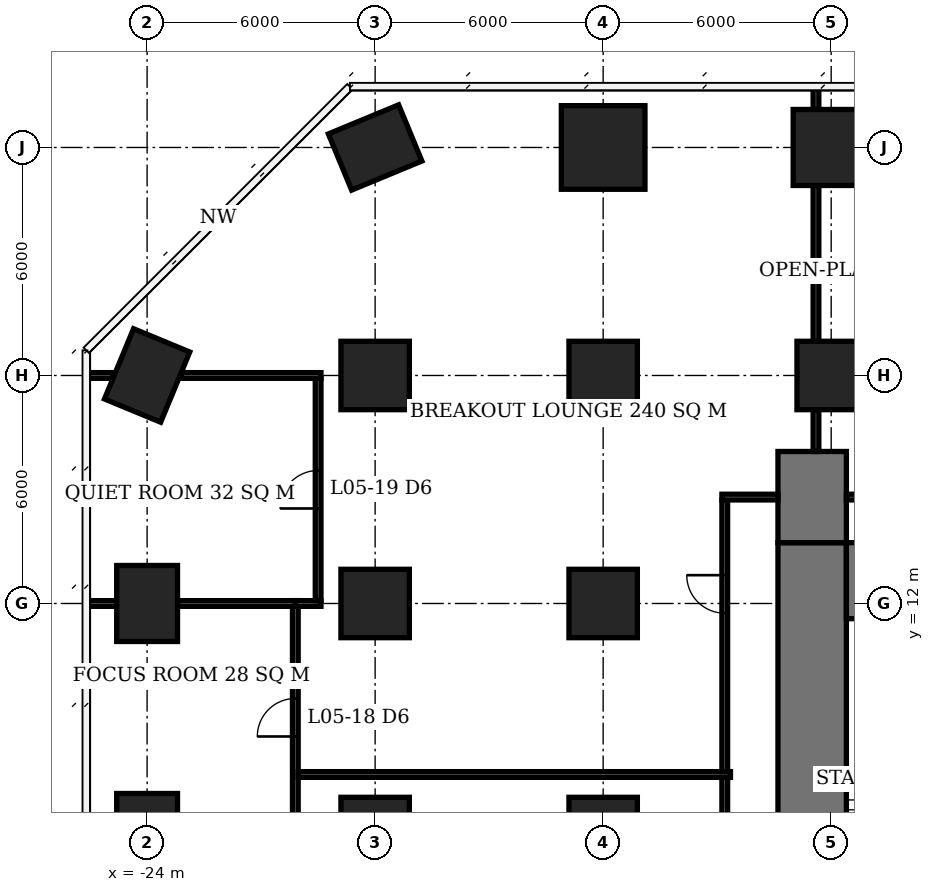
"""IFC4 building model, lengths in metres.
Left out: names, types, materials, properties, quantities, classifications, styles, units other than length and angle.
Written with IfcOpenShell. Run it as: python <this file> out.ifc"""

import sys

from ifc_helpers import new_model, si_unit, direction, frame, frame_2d, origin, origin_2d, place, context, subcontext, project, spatial, rectangle, extrude, element, fill, save


model = new_model("IFC4")
c1 = context("Model", 3, precision=1e-05, world=origin(), true_north=direction((0.0, 1.0)))
c2 = subcontext(c1, "Body", "Model", "MODEL_VIEW")
j1 = project(units=[si_unit("LENGTHUNIT", "METRE"), si_unit("PLANEANGLEUNIT", "RADIAN")], contexts=[c1])
p1 = place(None, origin())
s1 = spatial("IfcSite", under=j1, at=p1, CompositionType="ELEMENT")
p2 = place(p1, origin())
s2 = spatial("IfcBuilding", under=s1, at=p2, CompositionType="ELEMENT")
p3 = place(p2, frame((0.0, 0.0, 26.0)))
s3 = spatial("IfcBuildingStorey", under=s2, at=p3, CompositionType="ELEMENT", Elevation=26.0)
for number, where, z_axis, x_axis in (
    (1, (-24.0, 6.0, 0.0), (0.0, 0.0, 1.0), (0.0, 1.0, 0.0)),
    (2, (-24.0, 12.0, 0.0), (0.0, 0.0, 1.0), (0.0, 1.0, 0.0)),
    (3, (-24.0, 18.0, 0.0), (0.0, 0.0, 1.0), (0.383, 0.924, 0.0)),
):
    element("IfcColumn", number, at=place(p3, frame(where, z_axis=z_axis, x_axis=x_axis)), inside=s3, PredefinedType="COLUMN", context=c2, shape_type="SweptSolid", body=[
        extrude(rectangle(XDim=2.0, YDim=1.6, at=origin_2d()), origin(), (0.0, 0.0, 1.0), 3.9),
    ])
for number, where, z_axis, x_axis in (
    (4, (-18.0, 6.0, 0.0), (0.0, 0.0, 1.0), (1.0, 0.0, 0.0)),
    (5, (-18.0, 12.0, 0.0), (0.0, 0.0, 1.0), (1.0, 0.0, 0.0)),
    (6, (-18.0, 18.0, 0.0), (0.0, 0.0, 1.0), (1.0, 0.0, 0.0)),
):
    element("IfcColumn", number, at=place(p3, frame(where, z_axis=z_axis, x_axis=x_axis)), inside=s3, PredefinedType="COLUMN", context=c2, shape_type="SweptSolid", body=[
        extrude(rectangle(XDim=1.8, YDim=1.8, at=origin_2d()), origin(), (0.0, 0.0, 1.0), 3.9),
    ])
p4 = place(p3, frame((-18.0, 24.0, 0.0), z_axis=(0.0, 0.0, 1.0), x_axis=(0.923879532511, 0.382683432365, 0.0)))
e7 = element("IfcColumn", 7, at=p4, inside=s3, PredefinedType="COLUMN", context=c2, shape_type="SweptSolid", body=[
    extrude(rectangle(XDim=2.0, YDim=1.6, at=origin_2d()), origin(), (0.0, 0.0, 1.0), 3.9),
])
for number, where, z_axis, x_axis in (
    (8, (-12.0, 6.0, 0.0), (0.0, 0.0, 1.0), (1.0, 0.0, 0.0)),
    (9, (-12.0, 12.0, 0.0), (0.0, 0.0, 1.0), (1.0, 0.0, 0.0)),
    (10, (-12.0, 18.0, 0.0), (0.0, 0.0, 1.0), (1.0, 0.0, 0.0)),
):
    element("IfcColumn", number, at=place(p3, frame(where, z_axis=z_axis, x_axis=x_axis)), inside=s3, PredefinedType="COLUMN", context=c2, shape_type="SweptSolid", body=[
        extrude(rectangle(XDim=1.8, YDim=1.8, at=origin_2d()), origin(), (0.0, 0.0, 1.0), 3.9),
    ])
p5 = place(p3, frame((-12.0, 24.0, 0.0), z_axis=(0.0, 0.0, 1.0), x_axis=(1.0, 0.0, 0.0)))
e11 = element("IfcColumn", 11, at=p5, inside=s3, PredefinedType="COLUMN", context=c2, shape_type="SweptSolid", body=[
    extrude(rectangle(XDim=2.2, YDim=2.2, at=origin_2d()), origin(), (0.0, 0.0, 1.0), 3.9),
])
p6 = place(p3, frame((-6.0, 18.0, 0.0), z_axis=(0.0, 0.0, 1.0), x_axis=(1.0, 0.0, 0.0)))
e12 = element("IfcColumn", 12, at=p6, inside=s3, PredefinedType="COLUMN", context=c2, shape_type="SweptSolid", body=[
    extrude(rectangle(XDim=1.8, YDim=1.8, at=origin_2d()), origin(), (0.0, 0.0, 1.0), 3.9),
])
p7 = place(p3, frame((-6.0, 24.0, 0.0), z_axis=(0.0, 0.0, 1.0), x_axis=(1.0, 0.0, 0.0)))
e13 = element("IfcColumn", 13, at=p7, inside=s3, PredefinedType="COLUMN", context=c2, shape_type="SweptSolid", body=[
    extrude(rectangle(XDim=2.0, YDim=2.0, at=origin_2d()), origin(), (0.0, 0.0, 1.0), 3.9),
])
p8 = place(p3, frame((-5.6, 12.6, 0.0), z_axis=(0.0, 0.0, 1.0), x_axis=(1.0, 0.0, 0.0)))
e14 = element("IfcWall", 14, at=p8, inside=s3, PredefinedType="SHEAR", context=c2, shape_type="SweptSolid", body=[
    extrude(rectangle(XDim=23.2, YDim=2.0, at=frame_2d((11.6, 0.0))), origin(), (0.0, 0.0, 1.0), 3.9),
])
p9 = place(p3, frame((-6.5, -7.6, 0.0), z_axis=(0.0, 0.0, 1.0), x_axis=(0.0, 1.0, 0.0)))
e15 = element("IfcWall", 15, at=p9, inside=s3, PredefinedType="SHEAR", context=c2, shape_type="SweptSolid", body=[
    extrude(rectangle(XDim=21.2, YDim=1.8, at=frame_2d((10.6, 0.0))), origin(), (0.0, 0.0, 1.0), 3.9),
])
p10 = place(p9, frame((7.8, 0.0, 0.0)))
e16 = element("IfcOpeningElement", 16, at=p10, cuts=e15, PredefinedType="OPENING", context=c2, shape_type="SweptSolid", body=[
    extrude(rectangle(XDim=1.8, YDim=2.4, at=frame_2d((0.9, 1.2))), frame((0.0, 0.91, 0.0), z_axis=(0.0, -1.0, 0.0), x_axis=(1.0, 0.0, 0.0)), (0.0, 0.0, 1.0), 1.82),
])
p11 = place(p3, frame((-6.5, 13.6, 0.0), z_axis=(0.0, 0.0, 1.0), x_axis=(0.0, 1.0, 0.0)))
e17 = element("IfcWall", 17, at=p11, inside=s3, PredefinedType="SHEAR", context=c2, shape_type="SweptSolid", body=[
    extrude(rectangle(XDim=2.4, YDim=1.8, at=frame_2d((1.2, 0.0))), origin(), (0.0, 0.0, 1.0), 3.9),
])
p12 = place(p3, frame((-25.6, 12.0, 0.0), z_axis=(0.0, 0.0, 1.0), x_axis=(1.0, 0.0, 0.0)))
e18 = element("IfcWall", 18, at=p12, inside=s3, PredefinedType="PARTITIONING", context=c2, shape_type="SweptSolid", body=[
    extrude(rectangle(XDim=0.8, YDim=0.15, at=frame_2d((0.4, 0.0))), origin(), (0.0, 0.0, 1.0), 3.65),
])
p13 = place(p3, frame((-23.2, 12.0, 0.0), z_axis=(0.0, 0.0, 1.0), x_axis=(1.0, 0.0, 0.0)))
e19 = element("IfcWall", 19, at=p13, inside=s3, PredefinedType="PARTITIONING", context=c2, shape_type="SweptSolid", body=[
    extrude(rectangle(XDim=3.175, YDim=0.15, at=frame_2d((1.587, 0.0))), origin(), (0.0, 0.0, 1.0), 3.65),
])
p14 = place(p3, frame((-20.1, 12.0, 0.0), z_axis=(0.0, 0.0, 1.0), x_axis=(1.0, 0.0, 0.0)))
e20 = element("IfcWall", 20, at=p14, inside=s3, PredefinedType="PARTITIONING", context=c2, shape_type="SweptSolid", body=[
    extrude(rectangle(XDim=0.675, YDim=0.15, at=frame_2d((0.337, 0.0))), origin(), (0.0, 0.0, 1.0), 3.65),
])
p15 = place(p3, frame((-25.6, 18.0, 0.0), z_axis=(0.0, 0.0, 1.0), x_axis=(1.0, 0.0, 0.0)))
e21 = element("IfcWall", 21, at=p15, inside=s3, PredefinedType="PARTITIONING", context=c2, shape_type="SweptSolid", body=[
    extrude(rectangle(XDim=0.703, YDim=0.15, at=frame_2d((0.352, 0.0))), origin(), (0.0, 0.0, 1.0), 3.65),
])
p16 = place(p3, frame((-23.103, 18.0, 0.0), z_axis=(0.0, 0.0, 1.0), x_axis=(1.0, 0.0, 0.0)))
e22 = element("IfcWall", 22, at=p16, inside=s3, PredefinedType="PARTITIONING", context=c2, shape_type="SweptSolid", body=[
    extrude(rectangle(XDim=3.678, YDim=0.15, at=frame_2d((1.839, 0.0))), origin(), (0.0, 0.0, 1.0), 3.65),
])
p17 = place(p3, frame((-20.1, 6.075, 0.0), z_axis=(0.0, 0.0, 1.0), x_axis=(0.0, 1.0, 0.0)))
e23 = element("IfcWall", 23, at=p17, inside=s3, PredefinedType="PARTITIONING", context=c2, shape_type="SweptSolid", body=[
    extrude(rectangle(XDim=5.85, YDim=0.15, at=frame_2d((2.925, 0.0))), origin(), (0.0, 0.0, 1.0), 3.65),
])
p18 = place(p17, frame((2.425, 0.0, 0.0)))
e24 = element("IfcOpeningElement", 24, at=p18, cuts=e23, PredefinedType="OPENING", context=c2, shape_type="SweptSolid", body=[
    extrude(rectangle(XDim=1.0, YDim=2.1, at=frame_2d((0.5, 1.05))), frame((0.0, 0.085, 0.0), z_axis=(0.0, -1.0, 0.0), x_axis=(1.0, 0.0, 0.0)), (0.0, 0.0, 1.0), 0.17),
])
p19 = place(p3, frame((-19.5, 12.075, 0.0), z_axis=(0.0, 0.0, 1.0), x_axis=(0.0, 1.0, 0.0)))
e25 = element("IfcWall", 25, at=p19, inside=s3, PredefinedType="PARTITIONING", context=c2, shape_type="SweptSolid", body=[
    extrude(rectangle(XDim=5.85, YDim=0.15, at=frame_2d((2.925, 0.0))), origin(), (0.0, 0.0, 1.0), 3.65),
])
p20 = place(p19, frame((2.425, 0.0, 0.0)))
e26 = element("IfcOpeningElement", 26, at=p20, cuts=e25, PredefinedType="OPENING", context=c2, shape_type="SweptSolid", body=[
    extrude(rectangle(XDim=1.0, YDim=2.1, at=frame_2d((0.5, 1.05))), frame((0.0, 0.085, 0.0), z_axis=(0.0, -1.0, 0.0), x_axis=(1.0, 0.0, 0.0)), (0.0, 0.0, 1.0), 0.17),
])
p21 = place(p3, frame((-20.025, 7.5, 0.0), z_axis=(0.0, 0.0, 1.0), x_axis=(1.0, 0.0, 0.0)))
e27 = element("IfcWall", 27, at=p21, inside=s3, PredefinedType="PARTITIONING", context=c2, shape_type="SweptSolid", body=[
    extrude(rectangle(XDim=11.375, YDim=0.15, at=frame_2d((5.688, 0.0))), origin(), (0.0, 0.0, 1.0), 3.65),
])
p22 = place(p3, frame((-8.8, 1.575, 0.0), z_axis=(0.0, 0.0, 1.0), x_axis=(0.0, 1.0, 0.0)))
e28 = element("IfcWall", 28, at=p22, inside=s3, PredefinedType="PARTITIONING", context=c2, shape_type="SweptSolid", body=[
    extrude(rectangle(XDim=5.85, YDim=0.15, at=frame_2d((2.925, 0.0))), origin(), (0.0, 0.0, 1.0), 3.65),
])
p23 = place(p22, frame((1.525, 0.0, 0.0)))
e29 = element("IfcOpeningElement", 29, at=p23, cuts=e28, PredefinedType="OPENING", context=c2, shape_type="SweptSolid", body=[
    extrude(rectangle(XDim=1.0, YDim=2.1, at=frame_2d((0.5, 1.05))), frame((0.0, 0.085, 0.0), z_axis=(0.0, -1.0, 0.0), x_axis=(1.0, 0.0, 0.0)), (0.0, 0.0, 1.0), 0.17),
])
p24 = place(p3, frame((-8.8, 7.575, 0.0), z_axis=(0.0, 0.0, 1.0), x_axis=(0.0, 1.0, 0.0)))
e30 = element("IfcWall", 30, at=p24, inside=s3, PredefinedType="PARTITIONING", context=c2, shape_type="SweptSolid", body=[
    extrude(rectangle(XDim=7.15, YDim=0.15, at=frame_2d((3.575, 0.0))), origin(), (0.0, 0.0, 1.0), 3.65),
])
p25 = place(p24, frame((4.17, 0.0, 0.0)))
e31 = element("IfcOpeningElement", 31, at=p25, cuts=e30, PredefinedType="OPENING", context=c2, shape_type="SweptSolid", body=[
    extrude(rectangle(XDim=1.0, YDim=2.1, at=frame_2d((0.5, 1.05))), frame((0.0, 0.085, 0.0), z_axis=(0.0, -1.0, 0.0), x_axis=(1.0, 0.0, 0.0)), (0.0, 0.0, 1.0), 0.17),
])
p26 = place(p3, frame((-8.875, 14.8, 0.0), z_axis=(0.0, 0.0, 1.0), x_axis=(1.0, 0.0, 0.0)))
e32 = element("IfcWall", 32, at=p26, inside=s3, PredefinedType="PARTITIONING", context=c2, shape_type="SweptSolid", body=[
    extrude(rectangle(XDim=1.475, YDim=0.15, at=frame_2d((0.738, 0.0))), origin(), (0.0, 0.0, 1.0), 3.65),
])
p27 = place(p3, frame((-6.4, 16.0, 0.0), z_axis=(0.0, 0.0, 1.0), x_axis=(0.0, 1.0, 0.0)))
e33 = element("IfcWall", 33, at=p27, inside=s3, PredefinedType="PARTITIONING", context=c2, shape_type="SweptSolid", body=[
    extrude(rectangle(XDim=1.1, YDim=0.15, at=frame_2d((0.55, 0.0))), origin(), (0.0, 0.0, 1.0), 3.65),
])
p28 = place(p3, frame((-6.4, 18.9, 0.0), z_axis=(0.0, 0.0, 1.0), x_axis=(0.0, 1.0, 0.0)))
e34 = element("IfcWall", 34, at=p28, inside=s3, PredefinedType="PARTITIONING", context=c2, shape_type="SweptSolid", body=[
    extrude(rectangle(XDim=4.1, YDim=0.15, at=frame_2d((2.05, 0.0))), origin(), (0.0, 0.0, 1.0), 3.65),
])
p29 = place(p3, frame((-6.4, 25.0, 0.0), z_axis=(0.0, 0.0, 1.0), x_axis=(0.0, 1.0, 0.0)))
e35 = element("IfcWall", 35, at=p29, inside=s3, PredefinedType="PARTITIONING", context=c2, shape_type="SweptSolid", body=[
    extrude(rectangle(XDim=0.6, YDim=0.15, at=frame_2d((0.3, 0.0))), origin(), (0.0, 0.0, 1.0), 3.65),
])
p30 = place(p3, frame((-5.6, 14.8, 0.0), z_axis=(0.0, 0.0, 1.0), x_axis=(1.0, 0.0, 0.0)))
e36 = element("IfcWall", 36, at=p30, inside=s3, PredefinedType="PARTITIONING", context=c2, shape_type="SweptSolid", body=[
    extrude(rectangle(XDim=4.025, YDim=0.15, at=frame_2d((2.013, 0.0))), origin(), (0.0, 0.0, 1.0), 3.65),
])
p31 = place(p30, frame((2.165, 0.0, 0.0)))
e37 = element("IfcOpeningElement", 37, at=p31, cuts=e36, PredefinedType="OPENING", context=c2, shape_type="SweptSolid", body=[
    extrude(rectangle(XDim=1.0, YDim=2.1, at=frame_2d((0.5, 1.05))), frame((0.0, 0.085, 0.0), z_axis=(0.0, -1.0, 0.0), x_axis=(1.0, 0.0, 0.0)), (0.0, 0.0, 1.0), 0.17),
])
p32 = place(p18, origin())
e38 = element("IfcDoor", 38, at=p32, inside=s3, OperationType="SINGLE_SWING_LEFT", PredefinedType="DOOR", context=c2, shape_type="SweptSolid", body=[
    extrude(rectangle(XDim=1.0, YDim=2.1, at=frame_2d((0.5, 1.05))), frame((0.0, 0.025, 0.0), z_axis=(0.0, -1.0, 0.0), x_axis=(1.0, 0.0, 0.0)), (0.0, 0.0, 1.0), 0.05),
])
fill(e24, e38)
p33 = place(p20, origin())
e39 = element("IfcDoor", 39, at=p33, inside=s3, OperationType="SINGLE_SWING_LEFT", PredefinedType="DOOR", context=c2, shape_type="SweptSolid", body=[
    extrude(rectangle(XDim=1.0, YDim=2.1, at=frame_2d((0.5, 1.05))), frame((0.0, 0.025, 0.0), z_axis=(0.0, -1.0, 0.0), x_axis=(1.0, 0.0, 0.0)), (0.0, 0.0, 1.0), 0.05),
])
fill(e26, e39)
p34 = place(p25, origin())
e40 = element("IfcDoor", 40, at=p34, inside=s3, OperationType="SINGLE_SWING_RIGHT", PredefinedType="DOOR", context=c2, shape_type="SweptSolid", body=[
    extrude(rectangle(XDim=1.0, YDim=2.1, at=frame_2d((0.5, 1.05))), frame((0.0, 0.025, 0.0), z_axis=(0.0, -1.0, 0.0), x_axis=(1.0, 0.0, 0.0)), (0.0, 0.0, 1.0), 0.05),
])
fill(e31, e40)
save(model, sys.argv[1])
